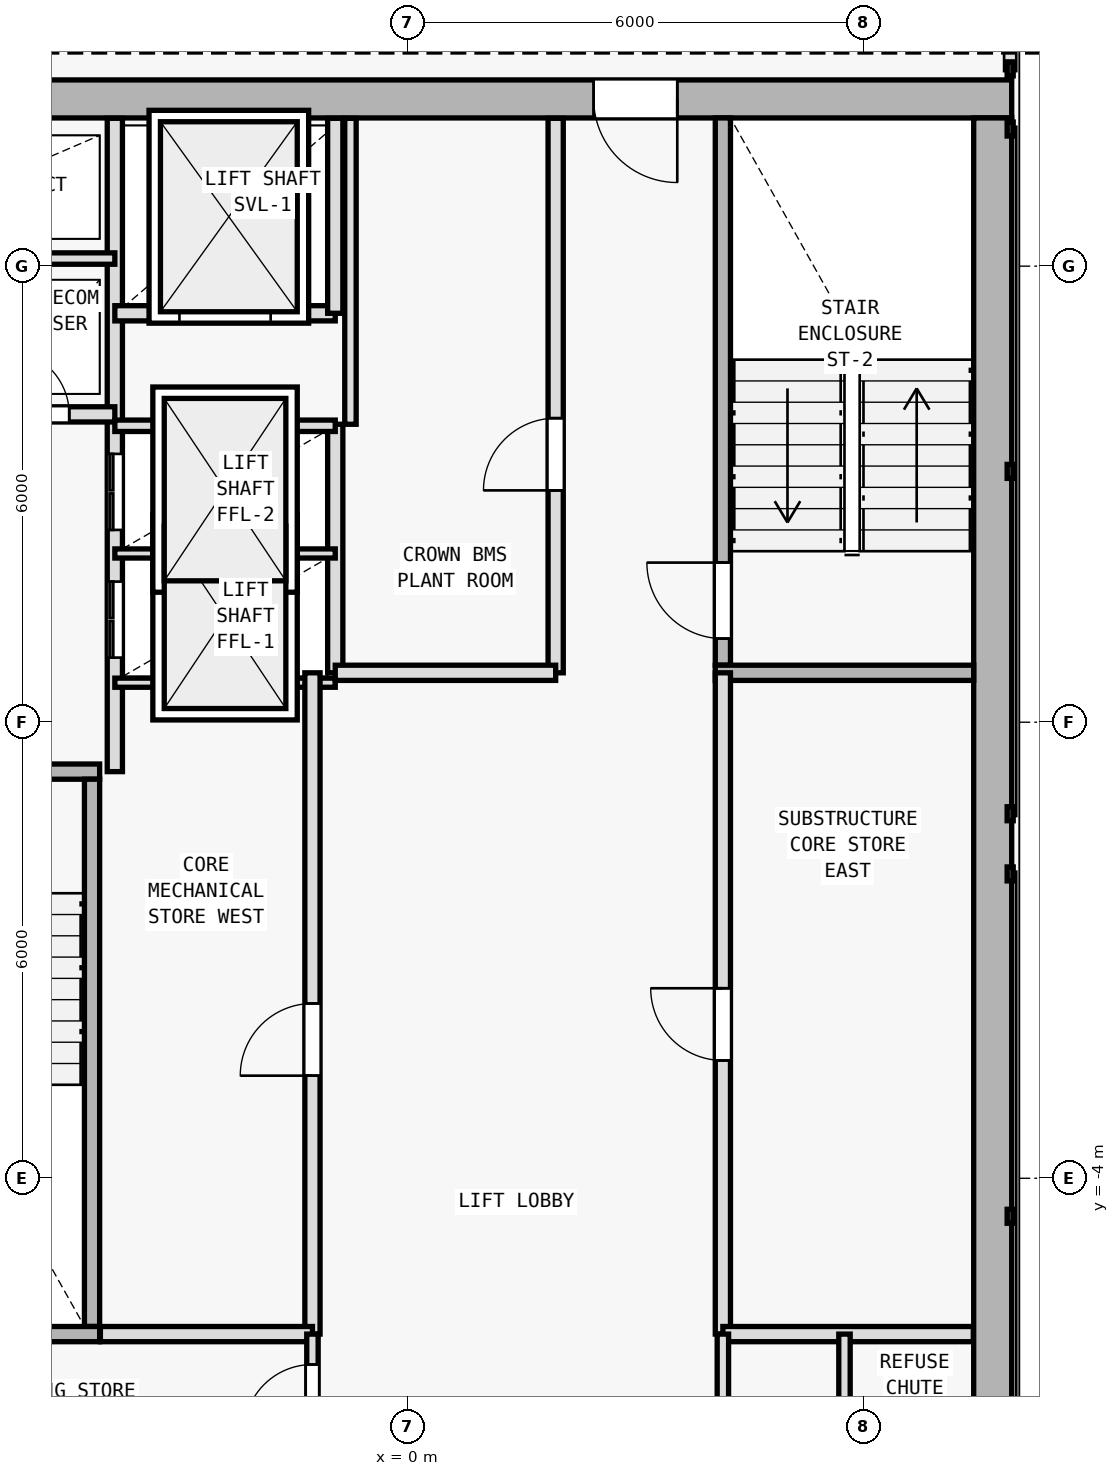
"""IFC4 building model, lengths in metres.
Left out: names, types, materials, properties, quantities, classifications, styles, units other than length and angle.
Written with IfcOpenShell. Run it as: python <this file> out.ifc"""

import sys

from ifc_helpers import new_model, si_unit, direction, frame, frame_2d, origin, origin_2d, place, context, subcontext, project, spatial, rectangle, i_section, extrude, element, fill, save


model = new_model("IFC4")
c1 = context("Model", 3, precision=1e-05, world=origin(), true_north=direction((0.0, 1.0)))
c2 = subcontext(c1, "Body", "Model", "MODEL_VIEW")
j1 = project(units=[si_unit("LENGTHUNIT", "METRE"), si_unit("PLANEANGLEUNIT", "RADIAN")], contexts=[c1])
p1 = place(None, origin())
s1 = spatial("IfcSite", under=j1, at=p1, CompositionType="ELEMENT")
p2 = place(p1, origin())
s2 = spatial("IfcBuilding", under=s1, at=p2, CompositionType="ELEMENT")
p3 = place(p2, frame((0.0, 0.0, 308.4)))
s3 = spatial("IfcBuildingStorey", under=s2, at=p3, CompositionType="ELEMENT", Elevation=308.4)
for number, where, z_axis, x_axis in (
    (1, (7.7, 10.2, 0.0), (0.0, 0.0, 1.0), (1.0, 0.0, 0.0)),
    (2, (7.7, 0.4, 0.0), (0.0, 0.0, 1.0), (1.0, 0.0, 0.0)),
):
    element("IfcColumn", number, at=place(p3, frame(where, z_axis=z_axis, x_axis=x_axis)), inside=s3, PredefinedType="COLUMN", context=c2, shape_type="SweptSolid", body=[
        extrude(i_section(OverallWidth=0.374, OverallDepth=0.372, WebThickness=0.012, FlangeThickness=0.02, FilletRadius=0.015, at=origin_2d()), origin(), (0.0, 0.0, 1.0), 3.6),
    ])
p4 = place(p3, frame((7.95, 10.2, 0.0), z_axis=(0.0, 0.0, 1.0), x_axis=(-1.0, 0.0, 0.0)))
e3 = element("IfcWall", 3, at=p4, inside=s3, PredefinedType="SHEAR", context=c2, shape_type="SweptSolid", body=[
    extrude(rectangle(XDim=15.9, YDim=0.5, at=frame_2d((7.95, 0.0))), origin(), (0.0, 0.0, 1.0), 3.34),
])
p5 = place(p4, frame((4.4, 0.0, 0.0)))
e4 = element("IfcOpeningElement", 4, at=p5, cuts=e3, PredefinedType="OPENING", context=c2, shape_type="SweptSolid", body=[
    extrude(rectangle(XDim=1.1, YDim=2.15, at=frame_2d((0.55, 1.075))), frame((0.0, 0.26, 0.0), z_axis=(0.0, -1.0, 0.0), x_axis=(1.0, 0.0, 0.0)), (0.0, 0.0, 1.0), 0.52),
])
p6 = place(p3, frame((7.7, 9.95, 0.0), z_axis=(0.0, 0.0, 1.0), x_axis=(0.0, -1.0, 0.0)))
e5 = element("IfcWall", 5, at=p6, inside=s3, PredefinedType="SHEAR", context=c2, shape_type="SweptSolid", body=[
    extrude(rectangle(XDim=19.1, YDim=0.5, at=frame_2d((9.55, 0.0))), origin(), (0.0, 0.0, 1.0), 3.34),
])
p7 = place(p3, frame((-7.45, 1.35, 0.0), z_axis=(0.0, 0.0, 1.0), x_axis=(1.0, 0.0, 0.0)))
e6 = element("IfcWall", 6, at=p7, inside=s3, PredefinedType="SOLIDWALL", context=c2, shape_type="SweptSolid", body=[
    extrude(rectangle(XDim=3.4, YDim=0.2, at=frame_2d((1.7, 0.0))), origin(), (0.0, 0.0, 1.0), 3.34),
])
p8 = place(p7, frame((0.65, 0.0, 0.0)))
e7 = element("IfcOpeningElement", 7, at=p8, cuts=e6, PredefinedType="OPENING", context=c2, shape_type="SweptSolid", body=[
    extrude(rectangle(XDim=1.0, YDim=2.15, at=frame_2d((0.5, 1.075))), frame((0.0, 0.11, 0.0), z_axis=(0.0, -1.0, 0.0), x_axis=(1.0, 0.0, 0.0)), (0.0, 0.0, 1.0), 0.22),
])
p9 = place(p3, frame((-4.15, -5.95, 0.0), z_axis=(0.0, 0.0, 1.0), x_axis=(0.0, 1.0, 0.0)))
e8 = element("IfcWall", 8, at=p9, inside=s3, PredefinedType="SOLIDWALL", context=c2, shape_type="SweptSolid", body=[
    extrude(rectangle(XDim=7.2, YDim=0.2, at=frame_2d((3.6, 0.0))), origin(), (0.0, 0.0, 1.0), 3.34),
])
p10 = place(p3, frame((-3.85, 1.35, 0.0), z_axis=(0.0, 0.0, 1.0), x_axis=(0.0, 1.0, 0.0)))
e9 = element("IfcWall", 9, at=p10, inside=s3, PredefinedType="SOLIDWALL", context=c2, shape_type="SweptSolid", body=[
    extrude(rectangle(XDim=8.595, YDim=0.2, at=frame_2d((4.297, 0.0))), origin(), (0.0, 0.0, 1.0), 3.34),
])
p11 = place(p10, frame((1.5, 0.0, 0.0)))
e10 = element("IfcOpeningElement", 10, at=p11, cuts=e9, PredefinedType="OPENING", context=c2, shape_type="SweptSolid", body=[
    extrude(rectangle(XDim=1.0, YDim=2.15, at=frame_2d((0.5, 1.075))), frame((0.0, 0.11, 0.0), z_axis=(0.0, -1.0, 0.0), x_axis=(1.0, 0.0, 0.0)), (0.0, 0.0, 1.0), 0.22),
])
p12 = place(p10, frame((3.18, 0.0, 0.0)))
e11 = element("IfcOpeningElement", 11, at=p12, cuts=e9, PredefinedType="OPENING", context=c2, shape_type="SweptSolid", body=[
    extrude(rectangle(XDim=1.0, YDim=2.15, at=frame_2d((0.5, 1.075))), frame((0.0, 0.11, 0.0), z_axis=(0.0, -1.0, 0.0), x_axis=(1.0, 0.0, 0.0)), (0.0, 0.0, 1.0), 0.22),
])
p13 = place(p3, frame((-7.445, 6.05, 0.0), z_axis=(0.0, 0.0, 1.0), x_axis=(1.0, 0.0, 0.0)))
e12 = element("IfcWall", 12, at=p13, inside=s3, PredefinedType="SOLIDWALL", context=c2, shape_type="SweptSolid", body=[
    extrude(rectangle(XDim=3.595, YDim=0.2, at=frame_2d((1.797, 0.0))), origin(), (0.0, 0.0, 1.0), 3.34),
])
p14 = place(p13, frame((0.345, 0.0, 0.0)))
e13 = element("IfcOpeningElement", 13, at=p14, cuts=e12, PredefinedType="OPENING", context=c2, shape_type="SweptSolid", body=[
    extrude(rectangle(XDim=0.85, YDim=2.1, at=frame_2d((0.425, 1.05))), frame((0.0, 0.11, 0.0), z_axis=(0.0, -1.0, 0.0), x_axis=(1.0, 0.0, 0.0)), (0.0, 0.0, 1.0), 0.22),
])
p15 = place(p13, frame((2.145, 0.0, 0.0)))
e14 = element("IfcOpeningElement", 14, at=p15, cuts=e12, PredefinedType="OPENING", context=c2, shape_type="SweptSolid", body=[
    extrude(rectangle(XDim=0.85, YDim=2.1, at=frame_2d((0.425, 1.05))), frame((0.0, 0.11, 0.0), z_axis=(0.0, -1.0, 0.0), x_axis=(1.0, 0.0, 0.0)), (0.0, 0.0, 1.0), 0.22),
])
p16 = place(p3, frame((-7.445, 8.1, 0.0), z_axis=(0.0, 0.0, 1.0), x_axis=(1.0, 0.0, 0.0)))
e15 = element("IfcWall", 15, at=p16, inside=s3, PredefinedType="PARTITIONING", context=c2, shape_type="SweptSolid", body=[
    extrude(rectangle(XDim=3.595, YDim=0.15, at=frame_2d((1.797, 0.0))), origin(), (0.0, 0.0, 1.0), 3.34),
])
p17 = place(p3, frame((4.15, 2.75, 0.0), z_axis=(0.0, 0.0, 1.0), x_axis=(0.0, 1.0, 0.0)))
e16 = element("IfcWall", 16, at=p17, inside=s3, PredefinedType="SOLIDWALL", context=c2, shape_type="SweptSolid", body=[
    extrude(rectangle(XDim=7.2, YDim=0.2, at=frame_2d((3.6, 0.0))), origin(), (0.0, 0.0, 1.0), 3.34),
])
p18 = place(p17, frame((0.35, 0.0, 0.0)))
e17 = element("IfcOpeningElement", 17, at=p18, cuts=e16, PredefinedType="OPENING", context=c2, shape_type="SweptSolid", body=[
    extrude(rectangle(XDim=1.0, YDim=2.15, at=frame_2d((0.5, 1.075))), frame((0.0, 0.11, 0.0), z_axis=(0.0, -1.0, 0.0), x_axis=(1.0, 0.0, 0.0)), (0.0, 0.0, 1.0), 0.22),
])
p19 = place(p3, frame((4.05, 2.65, 0.0), z_axis=(0.0, 0.0, 1.0), x_axis=(1.0, 0.0, 0.0)))
e18 = element("IfcWall", 18, at=p19, inside=s3, PredefinedType="SOLIDWALL", context=c2, shape_type="SweptSolid", body=[
    extrude(rectangle(XDim=3.4, YDim=0.2, at=frame_2d((1.7, 0.0))), origin(), (0.0, 0.0, 1.0), 3.34),
])
p20 = place(p3, frame((-0.95, 2.65, 0.0), z_axis=(0.0, 0.0, 1.0), x_axis=(0.0, 1.0, 0.0)))
e19 = element("IfcWall", 19, at=p20, inside=s3, PredefinedType="SOLIDWALL", context=c2, shape_type="SweptSolid", body=[
    extrude(rectangle(XDim=3.27, YDim=0.2, at=frame_2d((1.635, 0.0))), origin(), (0.0, 0.0, 1.0), 3.34),
])
for number, where, z_axis, x_axis in (
    (20, (-3.85, 2.52, 0.0), (0.0, 0.0, 1.0), (1.0, 0.0, 0.0)),
    (21, (-3.85, 4.22, 0.0), (0.0, 0.0, 1.0), (1.0, 0.0, 0.0)),
):
    element("IfcWall", number, at=place(p3, frame(where, z_axis=z_axis, x_axis=x_axis)), inside=s3, PredefinedType="PARTITIONING", context=c2, shape_type="SweptSolid", body=[
        extrude(rectangle(XDim=2.9, YDim=0.12, at=frame_2d((1.45, 0.0))), origin(), (0.0, 0.0, 1.0), 3.34),
    ])
p21 = place(p3, frame((-3.85, 5.9, 0.0), z_axis=(0.0, 0.0, 1.0), x_axis=(1.0, 0.0, 0.0)))
e22 = element("IfcWall", 22, at=p21, inside=s3, PredefinedType="PARTITIONING", context=c2, shape_type="SweptSolid", body=[
    extrude(rectangle(XDim=2.9, YDim=0.15, at=frame_2d((1.45, 0.0))), origin(), (0.0, 0.0, 1.0), 3.34),
])
p22 = place(p3, frame((-3.85, 7.38, 0.0), z_axis=(0.0, 0.0, 1.0), x_axis=(1.0, 0.0, 0.0)))
e23 = element("IfcWall", 23, at=p22, inside=s3, PredefinedType="SOLIDWALL", context=c2, shape_type="SweptSolid", body=[
    extrude(rectangle(XDim=2.9, YDim=0.2, at=frame_2d((1.45, 0.0))), origin(), (0.0, 0.0, 1.0), 3.34),
])
p23 = place(p22, frame((0.85, 0.0, 0.0)))
e24 = element("IfcOpeningElement", 24, at=p23, cuts=e23, PredefinedType="OPENING", context=c2, shape_type="SweptSolid", body=[
    extrude(rectangle(XDim=1.2, YDim=2.2, at=frame_2d((0.6, 1.1))), frame((0.0, 0.11, 0.0), z_axis=(0.0, -1.0, 0.0), x_axis=(1.0, 0.0, 0.0)), (0.0, 0.0, 1.0), 0.22),
])
p24 = place(p3, frame((-0.95, 7.38, 0.0), z_axis=(0.0, 0.0, 1.0), x_axis=(0.0, 1.0, 0.0)))
e25 = element("IfcWall", 25, at=p24, inside=s3, PredefinedType="SOLIDWALL", context=c2, shape_type="SweptSolid", body=[
    extrude(rectangle(XDim=2.565, YDim=0.2, at=frame_2d((1.283, 0.0))), origin(), (0.0, 0.0, 1.0), 3.34),
])
p25 = place(p3, frame((4.15, -6.05, 0.0), z_axis=(0.0, 0.0, 1.0), x_axis=(0.0, 1.0, 0.0)))
e26 = element("IfcWall", 26, at=p25, inside=s3, PredefinedType="SOLIDWALL", context=c2, shape_type="SweptSolid", body=[
    extrude(rectangle(XDim=8.7, YDim=0.2, at=frame_2d((4.35, 0.0))), origin(), (0.0, 0.0, 1.0), 3.34),
])
p26 = place(p25, frame((3.6, 0.0, 0.0)))
e27 = element("IfcOpeningElement", 27, at=p26, cuts=e26, PredefinedType="OPENING", context=c2, shape_type="SweptSolid", body=[
    extrude(rectangle(XDim=0.95, YDim=2.1, at=frame_2d((0.475, 1.05))), frame((0.0, 0.11, 0.0), z_axis=(0.0, -1.0, 0.0), x_axis=(1.0, 0.0, 0.0)), (0.0, 0.0, 1.0), 0.22),
])
p27 = place(p3, frame((-1.25, -6.05, 0.0), z_axis=(0.0, 0.0, 1.0), x_axis=(0.0, 1.0, 0.0)))
e28 = element("IfcWall", 28, at=p27, inside=s3, PredefinedType="SOLIDWALL", context=c2, shape_type="SweptSolid", body=[
    extrude(rectangle(XDim=8.7, YDim=0.2, at=frame_2d((4.35, 0.0))), origin(), (0.0, 0.0, 1.0), 3.34),
])
p28 = place(p27, frame((3.4, 0.0, 0.0)))
e29 = element("IfcOpeningElement", 29, at=p28, cuts=e28, PredefinedType="OPENING", context=c2, shape_type="SweptSolid", body=[
    extrude(rectangle(XDim=0.95, YDim=2.1, at=frame_2d((0.475, 1.05))), frame((0.0, 0.11, 0.0), z_axis=(0.0, -1.0, 0.0), x_axis=(1.0, 0.0, 0.0)), (0.0, 0.0, 1.0), 0.22),
])
p29 = place(p3, frame((1.95, 2.65, 0.0), z_axis=(0.0, 0.0, 1.0), x_axis=(0.0, 1.0, 0.0)))
e30 = element("IfcWall", 30, at=p29, inside=s3, PredefinedType="SOLIDWALL", context=c2, shape_type="SweptSolid", body=[
    extrude(rectangle(XDim=7.295, YDim=0.2, at=frame_2d((3.647, 0.0))), origin(), (0.0, 0.0, 1.0), 3.34),
])
p30 = place(p29, frame((2.4, 0.0, 0.0)))
e31 = element("IfcOpeningElement", 31, at=p30, cuts=e30, PredefinedType="OPENING", context=c2, shape_type="SweptSolid", body=[
    extrude(rectangle(XDim=0.95, YDim=2.1, at=frame_2d((0.475, 1.05))), frame((0.0, 0.11, 0.0), z_axis=(0.0, -1.0, 0.0), x_axis=(1.0, 0.0, 0.0)), (0.0, 0.0, 1.0), 0.22),
])
p31 = place(p3, frame((-0.95, 2.65, 0.0), z_axis=(0.0, 0.0, 1.0), x_axis=(1.0, 0.0, 0.0)))
e32 = element("IfcWall", 32, at=p31, inside=s3, PredefinedType="SOLIDWALL", context=c2, shape_type="SweptSolid", body=[
    extrude(rectangle(XDim=2.9, YDim=0.2, at=frame_2d((1.45, 0.0))), origin(), (0.0, 0.0, 1.0), 3.34),
])
p32 = place(p3, frame((-0.75, 5.92, 0.0), z_axis=(0.0, 0.0, 1.0), x_axis=(0.0, 1.0, 0.0)))
e33 = element("IfcWall", 33, at=p32, inside=s3, PredefinedType="PARTITIONING", context=c2, shape_type="SweptSolid", body=[
    extrude(rectangle(XDim=4.025, YDim=0.15, at=frame_2d((2.013, 0.0))), origin(), (0.0, 0.0, 1.0), 3.34),
])
p33 = place(p3, frame((-7.45, -6.05, 0.0), z_axis=(0.0, 0.0, 1.0), x_axis=(1.0, 0.0, 0.0)))
e34 = element("IfcWall", 34, at=p33, inside=s3, PredefinedType="SOLIDWALL", context=c2, shape_type="SweptSolid", body=[
    extrude(rectangle(XDim=3.4, YDim=0.2, at=frame_2d((1.7, 0.0))), origin(), (0.0, 0.0, 1.0), 3.34),
])
p34 = place(p3, frame((-4.04, -6.05, 0.0), z_axis=(0.0, 0.0, 1.0), x_axis=(1.0, 0.0, 0.0)))
e35 = element("IfcWall", 35, at=p34, inside=s3, PredefinedType="SOLIDWALL", context=c2, shape_type="SweptSolid", body=[
    extrude(rectangle(XDim=2.79, YDim=0.2, at=frame_2d((1.395, 0.0))), origin(), (0.0, 0.0, 1.0), 3.34),
])
p35 = place(p3, frame((4.15, -6.05, 0.0), z_axis=(0.0, 0.0, 1.0), x_axis=(1.0, 0.0, 0.0)))
e36 = element("IfcWall", 36, at=p35, inside=s3, PredefinedType="SOLIDWALL", context=c2, shape_type="SweptSolid", body=[
    extrude(rectangle(XDim=3.295, YDim=0.2, at=frame_2d((1.647, 0.0))), origin(), (0.0, 0.0, 1.0), 3.34),
])
p36 = place(p3, frame((-1.25, -9.145, 0.0), z_axis=(0.0, 0.0, 1.0), x_axis=(0.0, 1.0, 0.0)))
e37 = element("IfcWall", 37, at=p36, inside=s3, PredefinedType="PARTITIONING", context=c2, shape_type="SweptSolid", body=[
    extrude(rectangle(XDim=3.095, YDim=0.15, at=frame_2d((1.547, 0.0))), origin(), (0.0, 0.0, 1.0), 3.34),
])
p37 = place(p36, frame((1.795, 0.0, 0.0)))
e38 = element("IfcOpeningElement", 38, at=p37, cuts=e37, PredefinedType="OPENING", context=c2, shape_type="SweptSolid", body=[
    extrude(rectangle(XDim=0.9, YDim=2.1, at=frame_2d((0.45, 1.05))), frame((0.0, 0.085, 0.0), z_axis=(0.0, -1.0, 0.0), x_axis=(1.0, 0.0, 0.0)), (0.0, 0.0, 1.0), 0.17),
])
p38 = place(p36, frame((0.245, 0.0, 0.0)))
e39 = element("IfcOpeningElement", 39, at=p38, cuts=e37, PredefinedType="OPENING", context=c2, shape_type="SweptSolid", body=[
    extrude(rectangle(XDim=0.9, YDim=2.1, at=frame_2d((0.45, 1.05))), frame((0.0, 0.085, 0.0), z_axis=(0.0, -1.0, 0.0), x_axis=(1.0, 0.0, 0.0)), (0.0, 0.0, 1.0), 0.17),
])
p39 = place(p3, frame((4.15, -9.145, 0.0), z_axis=(0.0, 0.0, 1.0), x_axis=(0.0, 1.0, 0.0)))
e40 = element("IfcWall", 40, at=p39, inside=s3, PredefinedType="PARTITIONING", context=c2, shape_type="SweptSolid", body=[
    extrude(rectangle(XDim=3.095, YDim=0.15, at=frame_2d((1.547, 0.0))), origin(), (0.0, 0.0, 1.0), 3.34),
])
p40 = place(p39, frame((0.845, 0.0, 0.0)))
e41 = element("IfcOpeningElement", 41, at=p40, cuts=e40, PredefinedType="OPENING", context=c2, shape_type="SweptSolid", body=[
    extrude(rectangle(XDim=0.9, YDim=2.1, at=frame_2d((0.45, 1.05))), frame((0.0, 0.085, 0.0), z_axis=(0.0, -1.0, 0.0), x_axis=(1.0, 0.0, 0.0)), (0.0, 0.0, 1.0), 0.17),
])
p41 = place(p3, frame((5.75, -9.145, 0.0), z_axis=(0.0, 0.0, 1.0), x_axis=(0.0, 1.0, 0.0)))
e42 = element("IfcWall", 42, at=p41, inside=s3, PredefinedType="PARTITIONING", context=c2, shape_type="SweptSolid", body=[
    extrude(rectangle(XDim=3.095, YDim=0.15, at=frame_2d((1.547, 0.0))), origin(), (0.0, 0.0, 1.0), 3.34),
])
p42 = place(p41, frame((0.845, 0.0, 0.0)))
e43 = element("IfcOpeningElement", 43, at=p42, cuts=e42, PredefinedType="OPENING", context=c2, shape_type="SweptSolid", body=[
    extrude(rectangle(XDim=0.9, YDim=2.1, at=frame_2d((0.45, 1.05))), frame((0.0, 0.085, 0.0), z_axis=(0.0, -1.0, 0.0), x_axis=(1.0, 0.0, 0.0)), (0.0, 0.0, 1.0), 0.17),
])
p43 = place(p5, origin())
e44 = element("IfcDoor", 44, at=p43, inside=s3, OperationType="SINGLE_SWING_LEFT", PredefinedType="DOOR", context=c2, shape_type="SweptSolid", body=[
    extrude(rectangle(XDim=1.1, YDim=2.15, at=frame_2d((0.55, 1.075))), frame((0.0, 0.025, 0.0), z_axis=(0.0, -1.0, 0.0), x_axis=(1.0, 0.0, 0.0)), (0.0, 0.0, 1.0), 0.05),
])
fill(e4, e44)
p44 = place(p15, origin())
e45 = element("IfcDoor", 45, at=p44, inside=s3, OperationType="SINGLE_SWING_LEFT", PredefinedType="DOOR", context=c2, shape_type="SweptSolid", body=[
    extrude(rectangle(XDim=0.85, YDim=2.1, at=frame_2d((0.425, 1.05))), frame((0.0, 0.025, 0.0), z_axis=(0.0, -1.0, 0.0), x_axis=(1.0, 0.0, 0.0)), (0.0, 0.0, 1.0), 0.05),
])
fill(e14, e45)
p45 = place(p18, origin())
e46 = element("IfcDoor", 46, at=p45, inside=s3, OperationType="SINGLE_SWING_RIGHT", PredefinedType="DOOR", context=c2, shape_type="SweptSolid", body=[
    extrude(rectangle(XDim=1.0, YDim=2.15, at=frame_2d((0.5, 1.075))), frame((0.0, 0.025, 0.0), z_axis=(0.0, -1.0, 0.0), x_axis=(1.0, 0.0, 0.0)), (0.0, 0.0, 1.0), 0.05),
])
fill(e17, e46)
p46 = place(p23, origin())
e47 = element("IfcDoor", 47, at=p46, inside=s3, OperationType="DOUBLE_DOOR_SLIDING", PredefinedType="DOOR", context=c2, shape_type="SweptSolid", body=[
    extrude(rectangle(XDim=1.2, YDim=2.2, at=frame_2d((0.6, 1.1))), frame((0.0, 0.025, 0.0), z_axis=(0.0, -1.0, 0.0), x_axis=(1.0, 0.0, 0.0)), (0.0, 0.0, 1.0), 0.05),
])
fill(e24, e47)
p47 = place(p26, origin())
e48 = element("IfcDoor", 48, at=p47, inside=s3, OperationType="SINGLE_SWING_RIGHT", PredefinedType="DOOR", context=c2, shape_type="SweptSolid", body=[
    extrude(rectangle(XDim=0.95, YDim=2.1, at=frame_2d((0.475, 1.05))), frame((0.0, 0.025, 0.0), z_axis=(0.0, -1.0, 0.0), x_axis=(1.0, 0.0, 0.0)), (0.0, 0.0, 1.0), 0.05),
])
fill(e27, e48)
p48 = place(p28, origin())
e49 = element("IfcDoor", 49, at=p48, inside=s3, OperationType="SINGLE_SWING_LEFT", PredefinedType="DOOR", context=c2, shape_type="SweptSolid", body=[
    extrude(rectangle(XDim=0.95, YDim=2.1, at=frame_2d((0.475, 1.05))), frame((0.0, 0.025, 0.0), z_axis=(0.0, -1.0, 0.0), x_axis=(1.0, 0.0, 0.0)), (0.0, 0.0, 1.0), 0.05),
])
fill(e29, e49)
p49 = place(p30, origin())
e50 = element("IfcDoor", 50, at=p49, inside=s3, OperationType="SINGLE_SWING_LEFT", PredefinedType="DOOR", context=c2, shape_type="SweptSolid", body=[
    extrude(rectangle(XDim=0.95, YDim=2.1, at=frame_2d((0.475, 1.05))), frame((0.0, 0.025, 0.0), z_axis=(0.0, -1.0, 0.0), x_axis=(1.0, 0.0, 0.0)), (0.0, 0.0, 1.0), 0.05),
])
fill(e31, e50)
p50 = place(p11, origin())
e51 = element("IfcDoor", 51, at=p50, inside=s3, OperationType="DOUBLE_DOOR_SLIDING", PredefinedType="DOOR", context=c2, shape_type="SweptSolid", body=[
    extrude(rectangle(XDim=1.0, YDim=2.15, at=frame_2d((0.5, 1.075))), frame((0.0, 0.025, 0.0), z_axis=(0.0, -1.0, 0.0), x_axis=(1.0, 0.0, 0.0)), (0.0, 0.0, 1.0), 0.05),
])
fill(e10, e51)
p51 = place(p12, origin())
e52 = element("IfcDoor", 52, at=p51, inside=s3, OperationType="DOUBLE_DOOR_SLIDING", PredefinedType="DOOR", context=c2, shape_type="SweptSolid", body=[
    extrude(rectangle(XDim=1.0, YDim=2.15, at=frame_2d((0.5, 1.075))), frame((0.0, 0.025, 0.0), z_axis=(0.0, -1.0, 0.0), x_axis=(1.0, 0.0, 0.0)), (0.0, 0.0, 1.0), 0.05),
])
fill(e11, e52)
p52 = place(p37, origin())
e53 = element("IfcDoor", 53, at=p52, inside=s3, OperationType="SINGLE_SWING_LEFT", PredefinedType="DOOR", context=c2, shape_type="SweptSolid", body=[
    extrude(rectangle(XDim=0.9, YDim=2.1, at=frame_2d((0.45, 1.05))), frame((0.0, 0.025, 0.0), z_axis=(0.0, -1.0, 0.0), x_axis=(1.0, 0.0, 0.0)), (0.0, 0.0, 1.0), 0.05),
])
fill(e38, e53)
save(model, sys.argv[1])
